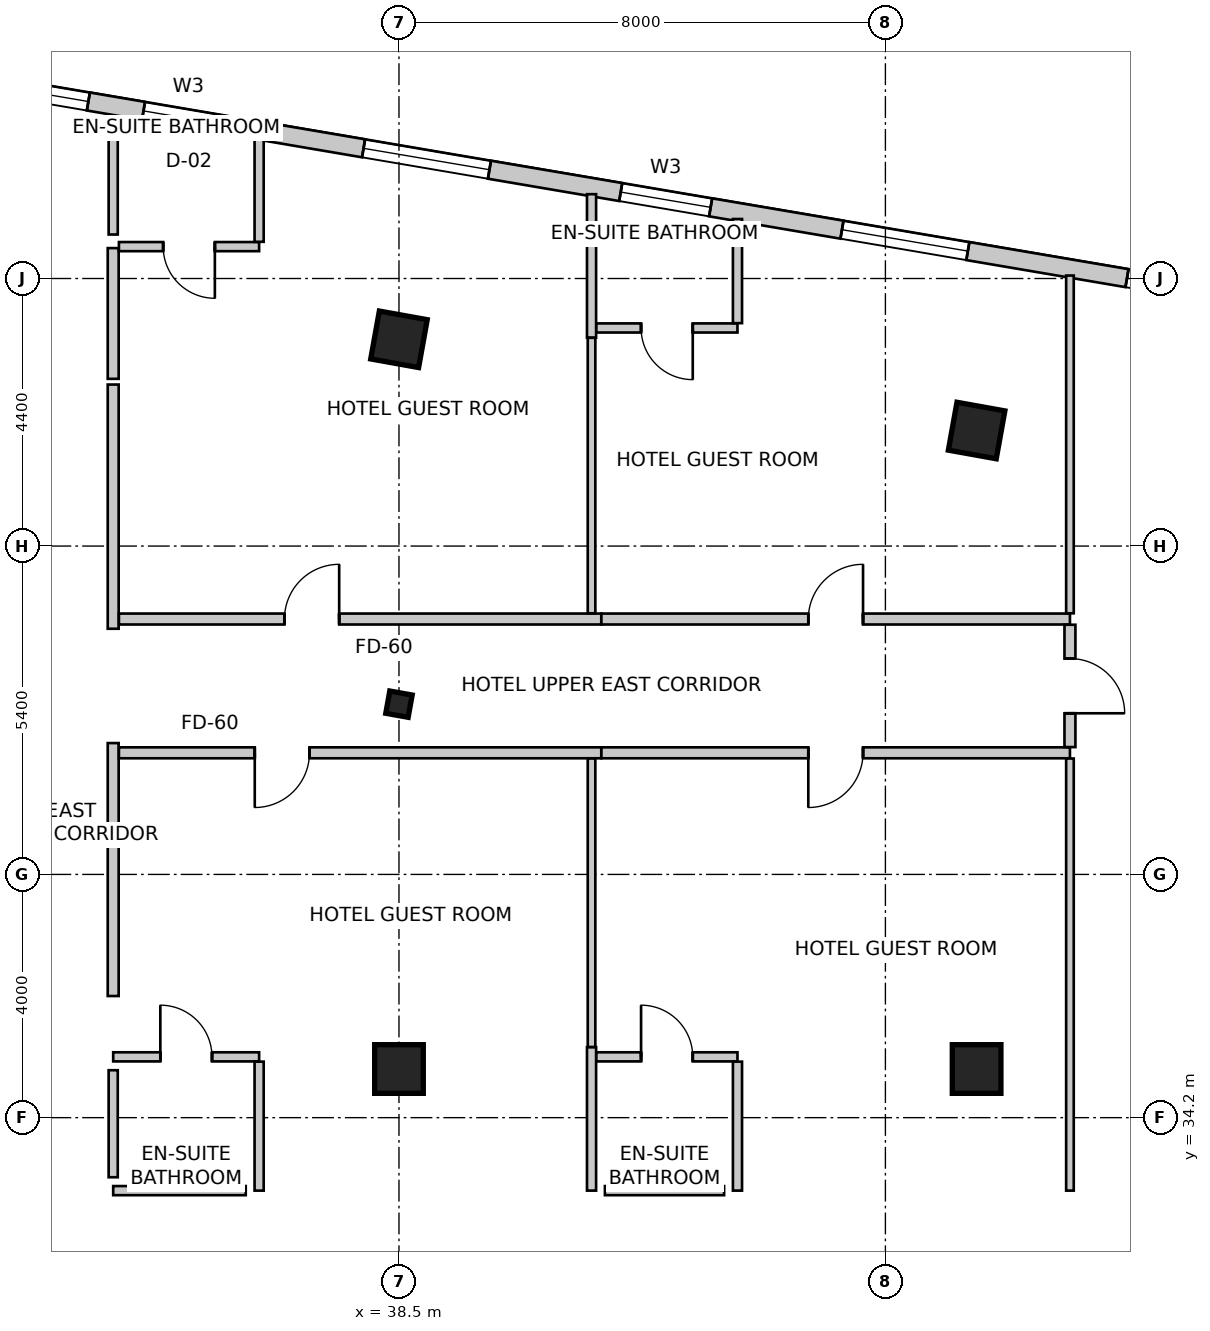
"""IFC4 building model, lengths in metres.
Left out: names, types, materials, properties, quantities, classifications, styles, units other than length and angle.
Written with IfcOpenShell. Run it as: python <this file> out.ifc"""

import sys

from ifc_helpers import new_model, si_unit, direction, frame, frame_2d, origin, origin_2d, place, context, subcontext, project, spatial, rectangle, i_section, extrude, source, transform, mapped, element, fill, save


model = new_model("IFC4")
c1 = context("Model", 3, precision=1e-05, world=origin(), true_north=direction((0.0, 1.0)))
c2 = subcontext(c1, "Body", "Model", "MODEL_VIEW")
j1 = project(units=[si_unit("LENGTHUNIT", "METRE"), si_unit("PLANEANGLEUNIT", "RADIAN")], contexts=[c1])
p1 = place(None, origin())
s1 = spatial("IfcSite", under=j1, at=p1, CompositionType="ELEMENT")
p2 = place(p1, origin())
s2 = spatial("IfcBuilding", under=s1, at=p2, CompositionType="ELEMENT")
p3 = place(p2, frame((0.0, 0.0, 157.4)))
s3 = spatial("IfcBuildingStorey", under=s2, at=p3, CompositionType="ELEMENT", Elevation=157.4)
m1 = source(origin(), c2, "Body", "SweptSolid", [
    extrude(rectangle(XDim=0.8, YDim=0.8, at=origin_2d()), origin(), (0.0, 0.0, 1.0), 3.6),
])
for number, where, z_axis, x_axis in (
    (1, (38.5, 47.0, 0.0), (0.0, 0.0, 1.0), (0.984, -0.177, 0.0)),
    (2, (48.0, 45.5, 0.0), (0.0, 0.0, 1.0), (0.984, -0.177, 0.0)),
    (3, (38.5, 35.0, 0.0), (0.0, 0.0, 1.0), (1.0, 0.0, 0.0)),
    (4, (48.0, 35.0, 0.0), (0.0, 0.0, 1.0), (1.0, 0.0, 0.0)),
):
    element("IfcColumn", number, at=place(p3, frame(where, z_axis=z_axis, x_axis=x_axis)), inside=s3, PredefinedType="COLUMN", context=c2, shape_type="MappedRepresentation", body=[
        mapped(m1, transform((0.0, 0.0, 0.0), scale=1.0)),
    ])
m2 = source(origin(), c2, "Body", "SweptSolid", [
    extrude(i_section(OverallWidth=0.374, OverallDepth=0.372, WebThickness=0.016, FlangeThickness=0.026, FilletRadius=0.015, at=origin_2d()), origin(), (0.0, 0.0, 1.0), 3.6),
])
p4 = place(p3, frame((38.5, 41.0, 0.0), z_axis=(0.0, 0.0, 1.0), x_axis=(0.984195607969, -0.17708474032, 0.0)))
e5 = element("IfcColumn", 5, at=p4, inside=s3, PredefinedType="COLUMN", context=c2, shape_type="MappedRepresentation", body=[
    mapped(m2, transform((0.0, 0.0, 0.0), scale=1.0)),
])
p5 = place(p3, frame((53.561, 47.48, 0.0), z_axis=(0.0, 0.0, 1.0), x_axis=(-0.985845173895, 0.167658262868, 0.0)))
e6 = element("IfcWall", 6, at=p5, inside=s3, PredefinedType="SOLIDWALL", context=c2, shape_type="SweptSolid", body=[
    extrude(rectangle(XDim=32.132, YDim=0.3, at=frame_2d((16.066, 0.0))), origin(), (0.0, 0.0, 1.0), 3.35),
])
m3 = source(origin(), c2, "Body", "SweptSolid", [
    extrude(rectangle(XDim=2.1, YDim=2.0, at=frame_2d((1.05, 1.0))), frame((0.0, 0.16, 0.0), z_axis=(0.0, -1.0, 0.0), x_axis=(1.0, 0.0, 0.0)), (0.0, 0.0, 1.0), 0.32),
])
p6 = place(p5, frame((1.032, 0.0, 0.85)))
e7 = element("IfcOpeningElement", 7, at=p6, cuts=e6, PredefinedType="OPENING", context=c2, shape_type="MappedRepresentation", body=[
    mapped(m3, transform((0.0, 0.0, 0.0), scale=1.0)),
])
p7 = place(p5, frame((5.787, 0.0, 0.85)))
e8 = element("IfcOpeningElement", 8, at=p7, cuts=e6, PredefinedType="OPENING", context=c2, shape_type="MappedRepresentation", body=[
    mapped(m3, transform((0.0, 0.0, 0.0), scale=1.0)),
])
m4 = source(origin(), c2, "Body", "SweptSolid", [
    extrude(rectangle(XDim=1.5, YDim=1.8, at=frame_2d((0.75, 0.9))), frame((0.0, 0.16, 0.0), z_axis=(0.0, -1.0, 0.0), x_axis=(1.0, 0.0, 0.0)), (0.0, 0.0, 1.0), 0.32),
])
p8 = place(p5, frame((10.078, 0.0, 0.85)))
e9 = element("IfcOpeningElement", 9, at=p8, cuts=e6, PredefinedType="OPENING", context=c2, shape_type="MappedRepresentation", body=[
    mapped(m4, transform((0.0, 0.0, 0.0), scale=1.0)),
])
p9 = place(p5, frame((13.768, 0.0, 0.85)))
e10 = element("IfcOpeningElement", 10, at=p9, cuts=e6, PredefinedType="OPENING", context=c2, shape_type="MappedRepresentation", body=[
    mapped(m3, transform((0.0, 0.0, 0.0), scale=1.0)),
])
p10 = place(p5, frame((18.039, 0.0, 0.85)))
e11 = element("IfcOpeningElement", 11, at=p10, cuts=e6, PredefinedType="OPENING", context=c2, shape_type="MappedRepresentation", body=[
    mapped(m4, transform((0.0, 0.0, 0.0), scale=1.0)),
])
p11 = place(p5, frame((20.459, 0.0, 0.85)))
e12 = element("IfcOpeningElement", 12, at=p11, cuts=e6, PredefinedType="OPENING", context=c2, shape_type="MappedRepresentation", body=[
    mapped(m3, transform((0.0, 0.0, 0.0), scale=1.0)),
])
p12 = place(p5, frame((25.55, 0.0, 0.85)))
e13 = element("IfcOpeningElement", 13, at=p12, cuts=e6, PredefinedType="OPENING", context=c2, shape_type="MappedRepresentation", body=[
    mapped(m3, transform((0.0, 0.0, 0.0), scale=1.0)),
])
m5 = source(origin(), c2, "Body", "SweptSolid", [
    extrude(rectangle(XDim=0.9, YDim=1.6, at=frame_2d((0.45, 0.8))), frame((0.0, 0.16, 0.0), z_axis=(0.0, -1.0, 0.0), x_axis=(1.0, 0.0, 0.0)), (0.0, 0.0, 1.0), 0.32),
])
p13 = place(p5, frame((30.65, 0.0, 0.85)))
e14 = element("IfcOpeningElement", 14, at=p13, cuts=e6, PredefinedType="OPENING", context=c2, shape_type="MappedRepresentation", body=[
    mapped(m5, transform((0.0, 0.0, 0.0), scale=1.0)),
])
p14 = place(p3, frame((33.8, 48.5, 0.0), z_axis=(0.0, 0.0, 1.0), x_axis=(0.0, -1.0, 0.0)))
e15 = element("IfcWall", 15, at=p14, inside=s3, PredefinedType="PARTITIONING", context=c2, shape_type="SweptSolid", body=[
    extrude(rectangle(XDim=2.15, YDim=0.18, at=frame_2d((1.075, 0.0))), origin(), (0.0, 0.0, 1.0), 2.492),
])
p15 = place(p3, frame((33.8, 46.256, 0.0), z_axis=(0.0, 0.0, 1.0), x_axis=(0.0, -1.0, 0.0)))
e16 = element("IfcWall", 16, at=p15, inside=s3, PredefinedType="PARTITIONING", context=c2, shape_type="SweptSolid", body=[
    extrude(rectangle(XDim=4.016, YDim=0.18, at=frame_2d((2.008, 0.0))), origin(), (0.0, 0.0, 1.0), 2.788),
])
p16 = place(p3, frame((33.8, 40.36, 0.0), z_axis=(0.0, 0.0, 1.0), x_axis=(0.0, -1.0, 0.0)))
e17 = element("IfcWall", 17, at=p16, inside=s3, PredefinedType="PARTITIONING", context=c2, shape_type="SweptSolid", body=[
    extrude(rectangle(XDim=4.16, YDim=0.18, at=frame_2d((2.08, 0.0))), origin(), (0.0, 0.0, 1.0), 3.35),
])
p17 = place(p3, frame((33.894, 42.4, 0.0), z_axis=(0.0, 0.0, 1.0), x_axis=(1.0, 0.0, 0.0)))
e18 = element("IfcWall", 18, at=p17, inside=s3, PredefinedType="PARTITIONING", context=c2, shape_type="SweptSolid", body=[
    extrude(rectangle(XDim=7.933, YDim=0.18, at=frame_2d((3.966, 0.0))), origin(), (0.0, 0.0, 1.0), 2.788),
])
m6 = source(origin(), c2, "Body", "SweptSolid", [
    extrude(rectangle(XDim=0.9, YDim=2.15, at=frame_2d((0.45, 1.075))), frame((0.0, 0.1, 0.0), z_axis=(0.0, -1.0, 0.0), x_axis=(1.0, 0.0, 0.0)), (0.0, 0.0, 1.0), 0.2),
])
p18 = place(p17, frame((2.723, 0.0, 0.0)))
e19 = element("IfcOpeningElement", 19, at=p18, cuts=e18, PredefinedType="OPENING", context=c2, shape_type="MappedRepresentation", body=[
    mapped(m6, transform((0.0, 0.0, 0.0), scale=1.0)),
])
p19 = place(p3, frame((41.827, 40.2, 0.0), z_axis=(0.0, 0.0, 1.0), x_axis=(-1.0, 0.0, 0.0)))
e20 = element("IfcWall", 20, at=p19, inside=s3, PredefinedType="PARTITIONING", context=c2, shape_type="SweptSolid", body=[
    extrude(rectangle(XDim=7.933, YDim=0.18, at=frame_2d((3.966, 0.0))), origin(), (0.0, 0.0, 1.0), 2.788),
])
p20 = place(p19, frame((4.799, 0.0, 0.0)))
e21 = element("IfcOpeningElement", 21, at=p20, cuts=e20, PredefinedType="OPENING", context=c2, shape_type="MappedRepresentation", body=[
    mapped(m6, transform((0.0, 0.0, 0.0), scale=1.0)),
])
p21 = place(p3, frame((41.829, 42.4, 0.0), z_axis=(0.0, 0.0, 1.0), x_axis=(1.0, 0.0, 0.0)))
e22 = element("IfcWall", 22, at=p21, inside=s3, PredefinedType="PARTITIONING", context=c2, shape_type="SweptSolid", body=[
    extrude(rectangle(XDim=7.706, YDim=0.18, at=frame_2d((3.853, 0.0))), origin(), (0.0, 0.0, 1.0), 2.788),
])
p22 = place(p21, frame((3.403, 0.0, 0.0)))
e23 = element("IfcOpeningElement", 23, at=p22, cuts=e22, PredefinedType="OPENING", context=c2, shape_type="MappedRepresentation", body=[
    mapped(m6, transform((0.0, 0.0, 0.0), scale=1.0)),
])
p23 = place(p3, frame((49.535, 40.2, 0.0), z_axis=(0.0, 0.0, 1.0), x_axis=(-1.0, 0.0, 0.0)))
e24 = element("IfcWall", 24, at=p23, inside=s3, PredefinedType="PARTITIONING", context=c2, shape_type="SweptSolid", body=[
    extrude(rectangle(XDim=7.706, YDim=0.18, at=frame_2d((3.853, 0.0))), origin(), (0.0, 0.0, 1.0), 2.788),
])
p24 = place(p23, frame((3.403, 0.0, 0.0)))
e25 = element("IfcOpeningElement", 25, at=p24, cuts=e24, PredefinedType="OPENING", context=c2, shape_type="MappedRepresentation", body=[
    mapped(m6, transform((0.0, 0.0, 0.0), scale=1.0)),
])
p25 = place(p3, frame((49.535, 42.306, 0.0), z_axis=(0.0, 0.0, 1.0), x_axis=(0.0, -1.0, 0.0)))
e26 = element("IfcWall", 26, at=p25, inside=s3, PredefinedType="PARTITIONING", context=c2, shape_type="SweptSolid", body=[
    extrude(rectangle(XDim=2.012, YDim=0.18, at=frame_2d((1.006, 0.0))), origin(), (0.0, 0.0, 1.0), 3.35),
])
p26 = place(p25, frame((0.556, 0.0, 0.0)))
e27 = element("IfcOpeningElement", 27, at=p26, cuts=e26, PredefinedType="OPENING", context=c2, shape_type="MappedRepresentation", body=[
    mapped(m6, transform((0.0, 0.0, 0.0), scale=1.0)),
])
p27 = place(p3, frame((36.2, 48.524, 0.0), z_axis=(0.0, 0.0, 1.0), x_axis=(-1.0, 0.0, 0.0)))
e28 = element("IfcWall", 28, at=p27, inside=s3, PredefinedType="PARTITIONING", context=c2, shape_type="SweptSolid", body=[
    extrude(rectangle(XDim=2.306, YDim=0.15, at=frame_2d((1.153, 0.0))), origin(), (0.0, 0.0, 1.0), 3.35),
])
m7 = source(origin(), c2, "Body", "SweptSolid", [
    extrude(rectangle(XDim=0.85, YDim=2.15, at=frame_2d((0.425, 1.075))), frame((0.0, 0.085, 0.0), z_axis=(0.0, -1.0, 0.0), x_axis=(1.0, 0.0, 0.0)), (0.0, 0.0, 1.0), 0.17),
])
p28 = place(p27, frame((0.728, 0.0, 0.0)))
e29 = element("IfcOpeningElement", 29, at=p28, cuts=e28, PredefinedType="OPENING", context=c2, shape_type="MappedRepresentation", body=[
    mapped(m7, transform((0.0, 0.0, 0.0), scale=1.0)),
])
p29 = place(p3, frame((36.2, 50.316, 0.0), z_axis=(0.0, 0.0, 1.0), x_axis=(0.0, -1.0, 0.0)))
e30 = element("IfcWall", 30, at=p29, inside=s3, PredefinedType="PARTITIONING", context=c2, shape_type="SweptSolid", body=[
    extrude(rectangle(XDim=1.713, YDim=0.15, at=frame_2d((0.856, 0.0))), origin(), (0.0, 0.0, 1.0), 3.35),
])
p30 = place(p3, frame((41.667, 49.387, 0.0), z_axis=(0.0, 0.0, 1.0), x_axis=(0.0, -1.0, 0.0)))
e31 = element("IfcWall", 31, at=p30, inside=s3, PredefinedType="PARTITIONING", context=c2, shape_type="SweptSolid", body=[
    extrude(rectangle(XDim=2.36, YDim=0.15, at=frame_2d((1.18, 0.0))), origin(), (0.0, 0.0, 1.0), 3.35),
])
p31 = place(p3, frame((41.667, 47.025, 0.0), z_axis=(0.0, 0.0, 1.0), x_axis=(0.0, -1.0, 0.0)))
e32 = element("IfcWall", 32, at=p31, inside=s3, PredefinedType="PARTITIONING", context=c2, shape_type="SweptSolid", body=[
    extrude(rectangle(XDim=4.531, YDim=0.125, at=frame_2d((2.265, 0.0))), origin(), (0.0, 0.0, 1.0), 2.492),
])
p32 = place(p3, frame((33.8, 35.2, 0.0), z_axis=(0.0, 0.0, 1.0), x_axis=(1.0, 0.0, 0.0)))
e33 = element("IfcWall", 33, at=p32, inside=s3, PredefinedType="PARTITIONING", context=c2, shape_type="SweptSolid", body=[
    extrude(rectangle(XDim=2.4, YDim=0.15, at=frame_2d((1.2, 0.0))), origin(), (0.0, 0.0, 1.0), 3.35),
])
p33 = place(p32, frame((0.775, 0.0, 0.0)))
e34 = element("IfcOpeningElement", 34, at=p33, cuts=e33, PredefinedType="OPENING", context=c2, shape_type="MappedRepresentation", body=[
    mapped(m7, transform((0.0, 0.0, 0.0), scale=1.0)),
])
p34 = place(p3, frame((36.2, 35.121, 0.0), z_axis=(0.0, 0.0, 1.0), x_axis=(0.0, -1.0, 0.0)))
e35 = element("IfcWall", 35, at=p34, inside=s3, PredefinedType="PARTITIONING", context=c2, shape_type="SweptSolid", body=[
    extrude(rectangle(XDim=2.121, YDim=0.15, at=frame_2d((1.061, 0.0))), origin(), (0.0, 0.0, 1.0), 3.35),
])
p35 = place(p3, frame((41.667, 35.36, 0.0), z_axis=(0.0, 0.0, 1.0), x_axis=(0.0, -1.0, 0.0)))
e36 = element("IfcWall", 36, at=p35, inside=s3, PredefinedType="PARTITIONING", context=c2, shape_type="SweptSolid", body=[
    extrude(rectangle(XDim=2.36, YDim=0.15, at=frame_2d((1.18, 0.0))), origin(), (0.0, 0.0, 1.0), 2.492),
])
p36 = place(p3, frame((41.667, 40.106, 0.0), z_axis=(0.0, 0.0, 1.0), x_axis=(0.0, -1.0, 0.0)))
e37 = element("IfcWall", 37, at=p36, inside=s3, PredefinedType="PARTITIONING", context=c2, shape_type="SweptSolid", body=[
    extrude(rectangle(XDim=4.744, YDim=0.125, at=frame_2d((2.372, 0.0))), origin(), (0.0, 0.0, 1.0), 2.788),
])
p37 = place(p3, frame((44.067, 47.187, 0.0), z_axis=(0.0, 0.0, 1.0), x_axis=(-1.0, 0.0, 0.0)))
e38 = element("IfcWall", 38, at=p37, inside=s3, PredefinedType="PARTITIONING", context=c2, shape_type="SweptSolid", body=[
    extrude(rectangle(XDim=2.321, YDim=0.15, at=frame_2d((1.16, 0.0))), origin(), (0.0, 0.0, 1.0), 3.35),
])
p38 = place(p37, frame((0.736, 0.0, 0.0)))
e39 = element("IfcOpeningElement", 39, at=p38, cuts=e38, PredefinedType="OPENING", context=c2, shape_type="MappedRepresentation", body=[
    mapped(m7, transform((0.0, 0.0, 0.0), scale=1.0)),
])
p39 = place(p3, frame((44.067, 48.979, 0.0), z_axis=(0.0, 0.0, 1.0), x_axis=(0.0, -1.0, 0.0)))
e40 = element("IfcWall", 40, at=p39, inside=s3, PredefinedType="PARTITIONING", context=c2, shape_type="SweptSolid", body=[
    extrude(rectangle(XDim=1.713, YDim=0.15, at=frame_2d((0.856, 0.0))), origin(), (0.0, 0.0, 1.0), 3.35),
])
p40 = place(p3, frame((49.535, 48.049, 0.0), z_axis=(0.0, 0.0, 1.0), x_axis=(0.0, -1.0, 0.0)))
e41 = element("IfcWall", 41, at=p40, inside=s3, PredefinedType="PARTITIONING", context=c2, shape_type="SweptSolid", body=[
    extrude(rectangle(XDim=5.555, YDim=0.125, at=frame_2d((2.777, 0.0))), origin(), (0.0, 0.0, 1.0), 3.35),
])
p41 = place(p3, frame((41.746, 35.2, 0.0), z_axis=(0.0, 0.0, 1.0), x_axis=(1.0, 0.0, 0.0)))
e42 = element("IfcWall", 42, at=p41, inside=s3, PredefinedType="PARTITIONING", context=c2, shape_type="SweptSolid", body=[
    extrude(rectangle(XDim=2.321, YDim=0.15, at=frame_2d((1.16, 0.0))), origin(), (0.0, 0.0, 1.0), 2.492),
])
p42 = place(p41, frame((0.736, 0.0, 0.0)))
e43 = element("IfcOpeningElement", 43, at=p42, cuts=e42, PredefinedType="OPENING", context=c2, shape_type="MappedRepresentation", body=[
    mapped(m7, transform((0.0, 0.0, 0.0), scale=1.0)),
])
p43 = place(p3, frame((44.067, 35.121, 0.0), z_axis=(0.0, 0.0, 1.0), x_axis=(0.0, -1.0, 0.0)))
e44 = element("IfcWall", 44, at=p43, inside=s3, PredefinedType="PARTITIONING", context=c2, shape_type="SweptSolid", body=[
    extrude(rectangle(XDim=2.121, YDim=0.15, at=frame_2d((1.061, 0.0))), origin(), (0.0, 0.0, 1.0), 2.492),
])
p44 = place(p3, frame((49.535, 40.106, 0.0), z_axis=(0.0, 0.0, 1.0), x_axis=(0.0, -1.0, 0.0)))
e45 = element("IfcWall", 45, at=p44, inside=s3, PredefinedType="PARTITIONING", context=c2, shape_type="SweptSolid", body=[
    extrude(rectangle(XDim=7.106, YDim=0.125, at=frame_2d((3.553, 0.0))), origin(), (0.0, 0.0, 1.0), 3.35),
])
p45 = place(p3, frame((33.8, 48.723, 0.0), z_axis=(0.0, 0.0, 1.0), x_axis=(0.0, 1.0, 0.0)))
e46 = element("IfcWall", 46, at=p45, inside=s3, PredefinedType="PARTITIONING", context=c2, shape_type="SweptSolid", body=[
    extrude(rectangle(XDim=1.778, YDim=0.15, at=frame_2d((0.889, 0.0))), origin(), (0.0, 0.0, 1.0), 3.35),
])
p46 = place(p3, frame((35.98, 33.0, 0.0), z_axis=(0.0, 0.0, 1.0), x_axis=(-1.0, 0.0, 0.0)))
e47 = element("IfcWall", 47, at=p46, inside=s3, PredefinedType="PARTITIONING", context=c2, shape_type="SweptSolid", body=[
    extrude(rectangle(XDim=2.18, YDim=0.15, at=frame_2d((1.09, 0.0))), origin(), (0.0, 0.0, 1.0), 3.35),
])
p47 = place(p3, frame((33.8, 33.22, 0.0), z_axis=(0.0, 0.0, 1.0), x_axis=(0.0, 1.0, 0.0)))
e48 = element("IfcWall", 48, at=p47, inside=s3, PredefinedType="PARTITIONING", context=c2, shape_type="SweptSolid", body=[
    extrude(rectangle(XDim=1.76, YDim=0.15, at=frame_2d((0.88, 0.0))), origin(), (0.0, 0.0, 1.0), 3.35),
])
p48 = place(p3, frame((43.847, 33.0, 0.0), z_axis=(0.0, 0.0, 1.0), x_axis=(-1.0, 0.0, 0.0)))
e49 = element("IfcWall", 49, at=p48, inside=s3, PredefinedType="PARTITIONING", context=c2, shape_type="SweptSolid", body=[
    extrude(rectangle(XDim=1.96, YDim=0.15, at=frame_2d((0.98, 0.0))), origin(), (0.0, 0.0, 1.0), 3.35),
])
m8 = source(origin(), c2, "Body", "SweptSolid", [
    extrude(rectangle(XDim=2.1, YDim=2.0, at=frame_2d((1.05, 1.0))), frame((0.0, -0.015, 0.0), z_axis=(0.0, -1.0, 0.0), x_axis=(1.0, 0.0, 0.0)), (0.0, 0.0, 1.0), 0.06),
])
p49 = place(p6, origin())
e50 = element("IfcWindow", 50, at=p49, inside=s3, PartitioningType="SINGLE_PANEL", PredefinedType="WINDOW", context=c2, shape_type="MappedRepresentation", body=[
    mapped(m8, transform((0.0, 0.0, 0.0), scale=1.0)),
])
fill(e7, e50)
p50 = place(p7, origin())
e51 = element("IfcWindow", 51, at=p50, inside=s3, PartitioningType="SINGLE_PANEL", PredefinedType="WINDOW", context=c2, shape_type="MappedRepresentation", body=[
    mapped(m8, transform((0.0, 0.0, 0.0), scale=1.0)),
])
fill(e8, e51)
m9 = source(origin(), c2, "Body", "SweptSolid", [
    extrude(rectangle(XDim=1.5, YDim=1.8, at=frame_2d((0.75, 0.9))), frame((0.0, -0.015, 0.0), z_axis=(0.0, -1.0, 0.0), x_axis=(1.0, 0.0, 0.0)), (0.0, 0.0, 1.0), 0.06),
])
p51 = place(p8, origin())
e52 = element("IfcWindow", 52, at=p51, inside=s3, PartitioningType="SINGLE_PANEL", PredefinedType="WINDOW", context=c2, shape_type="MappedRepresentation", body=[
    mapped(m9, transform((0.0, 0.0, 0.0), scale=1.0)),
])
fill(e9, e52)
p52 = place(p9, origin())
e53 = element("IfcWindow", 53, at=p52, inside=s3, PartitioningType="SINGLE_PANEL", PredefinedType="WINDOW", context=c2, shape_type="MappedRepresentation", body=[
    mapped(m8, transform((0.0, 0.0, 0.0), scale=1.0)),
])
fill(e10, e53)
p53 = place(p10, origin())
e54 = element("IfcWindow", 54, at=p53, inside=s3, PartitioningType="SINGLE_PANEL", PredefinedType="WINDOW", context=c2, shape_type="MappedRepresentation", body=[
    mapped(m9, transform((0.0, 0.0, 0.0), scale=1.0)),
])
fill(e11, e54)
p54 = place(p11, origin())
e55 = element("IfcWindow", 55, at=p54, inside=s3, PartitioningType="SINGLE_PANEL", PredefinedType="WINDOW", context=c2, shape_type="MappedRepresentation", body=[
    mapped(m8, transform((0.0, 0.0, 0.0), scale=1.0)),
])
fill(e12, e55)
m10 = source(origin(), c2, "Body", "SweptSolid", [
    extrude(rectangle(XDim=0.85, YDim=2.15, at=frame_2d((0.425, 1.075))), frame((0.0, 0.025, 0.0), z_axis=(0.0, -1.0, 0.0), x_axis=(1.0, 0.0, 0.0)), (0.0, 0.0, 1.0), 0.05),
])
p55 = place(p28, origin())
e56 = element("IfcDoor", 56, at=p55, inside=s3, OperationType="SINGLE_SWING_LEFT", PredefinedType="DOOR", context=c2, shape_type="MappedRepresentation", body=[
    mapped(m10, transform((0.0, 0.0, 0.0), scale=1.0)),
])
fill(e29, e56)
m11 = source(origin(), c2, "Body", "SweptSolid", [
    extrude(rectangle(XDim=0.9, YDim=2.15, at=frame_2d((0.45, 1.075))), frame((0.0, 0.025, 0.0), z_axis=(0.0, -1.0, 0.0), x_axis=(1.0, 0.0, 0.0)), (0.0, 0.0, 1.0), 0.05),
])
p56 = place(p18, origin())
e57 = element("IfcDoor", 57, at=p56, inside=s3, OperationType="SINGLE_SWING_RIGHT", PredefinedType="DOOR", context=c2, shape_type="MappedRepresentation", body=[
    mapped(m11, transform((0.0, 0.0, 0.0), scale=1.0)),
])
fill(e19, e57)
p57 = place(p33, origin())
e58 = element("IfcDoor", 58, at=p57, inside=s3, OperationType="SINGLE_SWING_LEFT", PredefinedType="DOOR", context=c2, shape_type="MappedRepresentation", body=[
    mapped(m10, transform((0.0, 0.0, 0.0), scale=1.0)),
])
fill(e34, e58)
p58 = place(p20, origin())
e59 = element("IfcDoor", 59, at=p58, inside=s3, OperationType="SINGLE_SWING_RIGHT", PredefinedType="DOOR", context=c2, shape_type="MappedRepresentation", body=[
    mapped(m11, transform((0.0, 0.0, 0.0), scale=1.0)),
])
fill(e21, e59)
p59 = place(p38, origin())
e60 = element("IfcDoor", 60, at=p59, inside=s3, OperationType="SINGLE_SWING_LEFT", PredefinedType="DOOR", context=c2, shape_type="MappedRepresentation", body=[
    mapped(m10, transform((0.0, 0.0, 0.0), scale=1.0)),
])
fill(e39, e60)
p60 = place(p22, origin())
e61 = element("IfcDoor", 61, at=p60, inside=s3, OperationType="SINGLE_SWING_RIGHT", PredefinedType="DOOR", context=c2, shape_type="MappedRepresentation", body=[
    mapped(m11, transform((0.0, 0.0, 0.0), scale=1.0)),
])
fill(e23, e61)
p61 = place(p42, origin())
e62 = element("IfcDoor", 62, at=p61, inside=s3, OperationType="SINGLE_SWING_LEFT", PredefinedType="DOOR", context=c2, shape_type="MappedRepresentation", body=[
    mapped(m10, transform((0.0, 0.0, 0.0), scale=1.0)),
])
fill(e43, e62)
p62 = place(p24, origin())
e63 = element("IfcDoor", 63, at=p62, inside=s3, OperationType="SINGLE_SWING_RIGHT", PredefinedType="DOOR", context=c2, shape_type="MappedRepresentation", body=[
    mapped(m11, transform((0.0, 0.0, 0.0), scale=1.0)),
])
fill(e25, e63)
p63 = place(p26, origin())
e64 = element("IfcDoor", 64, at=p63, inside=s3, OperationType="SINGLE_SWING_RIGHT", PredefinedType="DOOR", context=c2, shape_type="MappedRepresentation", body=[
    mapped(m11, transform((0.0, 0.0, 0.0), scale=1.0)),
])
fill(e27, e64)
save(model, sys.argv[1])
